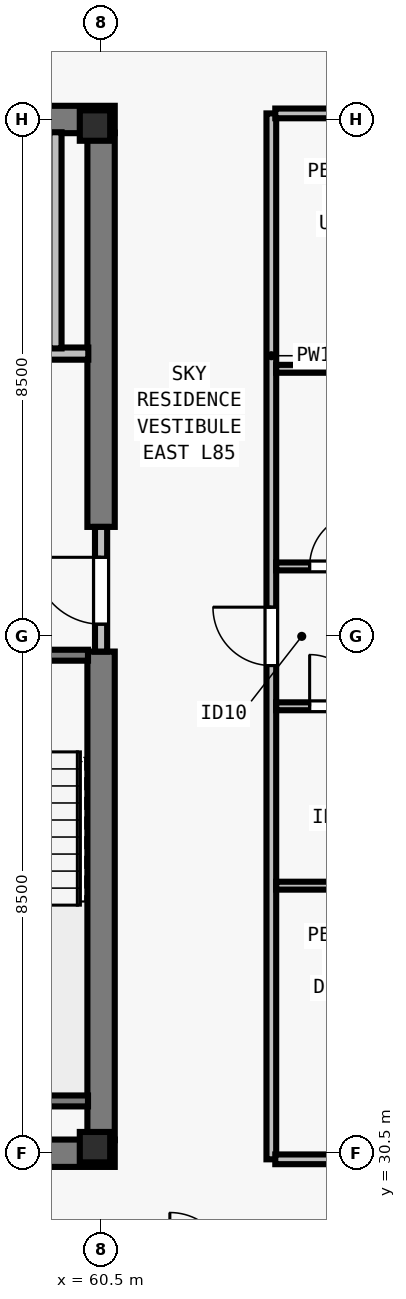
"""IFC4 building model, lengths in metres.
Left out: names, types, materials, properties, quantities, classifications, styles, units other than length and angle.
Written with IfcOpenShell. Run it as: python <this file> out.ifc"""

import sys

from ifc_helpers import new_model, si_unit, direction, frame, frame_2d, origin, origin_2d, place, context, subcontext, project, spatial, rectangle, i_section, extrude, element, fill, save


model = new_model("IFC4")
c1 = context("Model", 3, precision=1e-05, world=origin(), true_north=direction((0.0, 1.0)))
c2 = subcontext(c1, "Body", "Model", "MODEL_VIEW")
j1 = project(units=[si_unit("LENGTHUNIT", "METRE"), si_unit("PLANEANGLEUNIT", "RADIAN")], contexts=[c1])
p1 = place(None, origin())
s1 = spatial("IfcSite", under=j1, at=p1, CompositionType="ELEMENT")
p2 = place(p1, origin())
s2 = spatial("IfcBuilding", under=s1, at=p2, CompositionType="ELEMENT")
p3 = place(p2, frame((0.0, 0.0, 308.5)))
s3 = spatial("IfcBuildingStorey", under=s2, at=p3, CompositionType="ELEMENT", Elevation=308.5)
for number, where, z_axis, x_axis in (
    (1, (60.4, 30.6, 0.0), (0.0, 0.0, 1.0), (1.0, 0.0, 0.0)),
    (2, (60.4, 47.4, 0.0), (0.0, 0.0, 1.0), (1.0, 0.0, 0.0)),
):
    element("IfcColumn", number, at=place(p3, frame(where, z_axis=z_axis, x_axis=x_axis)), inside=s3, PredefinedType="COLUMN", context=c2, shape_type="SweptSolid", body=[
        extrude(i_section(OverallWidth=0.5, OverallDepth=0.5, WebThickness=0.028, FlangeThickness=0.045, at=origin_2d()), origin(), (0.0, 0.0, 1.0), 3.5),
    ])
for number, where, z_axis, x_axis in (
    (3, (43.275, 30.5, 0.0), (0.0, 0.0, 1.0), (1.0, 0.0, 0.0)),
    (4, (43.275, 47.5, 0.0), (0.0, 0.0, 1.0), (1.0, 0.0, 0.0)),
):
    element("IfcWall", number, at=place(p3, frame(where, z_axis=z_axis, x_axis=x_axis)), inside=s3, PredefinedType="SHEAR", context=c2, shape_type="SweptSolid", body=[
        extrude(rectangle(XDim=17.45, YDim=0.45, at=frame_2d((8.725, 0.0))), origin(), (0.0, 0.0, 1.0), 3.29),
    ])
p4 = place(p3, frame((60.5, 30.715, 0.0), z_axis=(0.0, 0.0, 1.0), x_axis=(0.0, 1.0, 0.0)))
e5 = element("IfcWall", 5, at=p4, inside=s3, PredefinedType="SHEAR", context=c2, shape_type="SweptSolid", body=[
    extrude(rectangle(XDim=8.035, YDim=0.45, at=frame_2d((4.018, 0.0))), origin(), (0.0, 0.0, 1.0), 3.29),
])
p5 = place(p3, frame((60.5, 40.8, 0.0), z_axis=(0.0, 0.0, 1.0), x_axis=(0.0, 1.0, 0.0)))
e6 = element("IfcWall", 6, at=p5, inside=s3, PredefinedType="SHEAR", context=c2, shape_type="SweptSolid", body=[
    extrude(rectangle(XDim=6.485, YDim=0.45, at=frame_2d((3.242, 0.0))), origin(), (0.0, 0.0, 1.0), 3.29),
])
p6 = place(p3, frame((60.5, 38.75, 0.0), z_axis=(0.0, 0.0, 1.0), x_axis=(0.0, 1.0, 0.0)))
e7 = element("IfcWall", 7, at=p6, inside=s3, PredefinedType="SOLIDWALL", context=c2, shape_type="SweptSolid", body=[
    extrude(rectangle(XDim=2.05, YDim=0.2, at=frame_2d((1.025, 0.0))), origin(), (0.0, 0.0, 1.0), 3.29),
])
p7 = place(p6, frame((0.45, 0.0, 0.0)))
e8 = element("IfcOpeningElement", 8, at=p7, cuts=e7, PredefinedType="OPENING", context=c2, shape_type="SweptSolid", body=[
    extrude(rectangle(XDim=1.1, YDim=2.15, at=frame_2d((0.55, 1.075))), frame((0.0, 0.11, 0.0), z_axis=(0.0, -1.0, 0.0), x_axis=(1.0, 0.0, 0.0)), (0.0, 0.0, 1.0), 0.22),
])
p8 = place(p3, frame((56.735, 43.65, 0.0), z_axis=(0.0, 0.0, 1.0), x_axis=(1.0, 0.0, 0.0)))
e9 = element("IfcWall", 9, at=p8, inside=s3, PredefinedType="SOLIDWALL", context=c2, shape_type="SweptSolid", body=[
    extrude(rectangle(XDim=3.555, YDim=0.2, at=frame_2d((1.777, 0.0))), origin(), (0.0, 0.0, 1.0), 3.29),
])
p9 = place(p8, frame((1.295, 0.0, 0.0)))
e10 = element("IfcOpeningElement", 10, at=p9, cuts=e9, PredefinedType="OPENING", context=c2, shape_type="SweptSolid", body=[
    extrude(rectangle(XDim=1.1, YDim=2.2, at=frame_2d((0.55, 1.1))), frame((0.0, 0.11, 0.0), z_axis=(0.0, -1.0, 0.0), x_axis=(1.0, 0.0, 0.0)), (0.0, 0.0, 1.0), 0.22),
])
p10 = place(p3, frame((59.75, 43.735, 0.0), z_axis=(0.0, 0.0, 1.0), x_axis=(0.0, 1.0, 0.0)))
e11 = element("IfcWall", 11, at=p10, inside=s3, PredefinedType="SOLIDWALL", context=c2, shape_type="SweptSolid", body=[
    extrude(rectangle(XDim=3.555, YDim=0.2, at=frame_2d((1.777, 0.0))), origin(), (0.0, 0.0, 1.0), 3.29),
])
p11 = place(p3, frame((63.3, 30.4, 0.0), z_axis=(0.0, 0.0, 1.0), x_axis=(0.0, 1.0, 0.0)))
e12 = element("IfcWall", 12, at=p11, inside=s3, PredefinedType="PARTITIONING", context=c2, shape_type="SweptSolid", body=[
    extrude(rectangle(XDim=17.2, YDim=0.16, at=frame_2d((8.6, 0.0))), origin(), (0.0, 0.0, 1.0), 3.29),
])
p12 = place(p11, frame((8.12, 0.0, 0.0)))
e13 = element("IfcOpeningElement", 13, at=p12, cuts=e12, PredefinedType="OPENING", context=c2, shape_type="SweptSolid", body=[
    extrude(rectangle(XDim=0.96, YDim=2.18, at=frame_2d((0.48, 1.09))), frame((0.0, 0.09, 0.0), z_axis=(0.0, -1.0, 0.0), x_axis=(1.0, 0.0, 0.0)), (0.0, 0.0, 1.0), 0.18),
])
for number, where, z_axis, x_axis in (
    (14, (63.365, 30.4, 0.0), (0.0, 0.0, 1.0), (1.0, 0.0, 0.0)),
    (15, (63.365, 47.6, 0.0), (0.0, 0.0, 1.0), (1.0, 0.0, 0.0)),
):
    element("IfcWall", number, at=place(p3, frame(where, z_axis=z_axis, x_axis=x_axis)), inside=s3, PredefinedType="PARTITIONING", context=c2, shape_type="SweptSolid", body=[
        extrude(rectangle(XDim=9.35, YDim=0.16, at=frame_2d((4.675, 0.0))), origin(), (0.0, 0.0, 1.0), 3.29),
    ])
p13 = place(p3, frame((63.38, 34.9, 0.0), z_axis=(0.0, 0.0, 1.0), x_axis=(1.0, 0.0, 0.0)))
e16 = element("IfcWall", 16, at=p13, inside=s3, PredefinedType="PLUMBINGWALL", context=c2, shape_type="SweptSolid", body=[
    extrude(rectangle(XDim=2.75, YDim=0.13, at=frame_2d((1.375, 0.0))), origin(), (0.0, 0.0, 1.0), 3.29),
])
p14 = place(p3, frame((63.38, 37.85, 0.0), z_axis=(0.0, 0.0, 1.0), x_axis=(1.0, 0.0, 0.0)))
e17 = element("IfcWall", 17, at=p14, inside=s3, PredefinedType="PLUMBINGWALL", context=c2, shape_type="SweptSolid", body=[
    extrude(rectangle(XDim=2.75, YDim=0.13, at=frame_2d((1.375, 0.0))), origin(), (0.0, 0.0, 1.0), 3.29),
])
p15 = place(p14, frame((0.55, 0.0, 0.0)))
e18 = element("IfcOpeningElement", 18, at=p15, cuts=e17, PredefinedType="OPENING", context=c2, shape_type="SweptSolid", body=[
    extrude(rectangle(XDim=0.85, YDim=2.08, at=frame_2d((0.425, 1.04))), frame((0.0, 0.075, 0.0), z_axis=(0.0, -1.0, 0.0), x_axis=(1.0, 0.0, 0.0)), (0.0, 0.0, 1.0), 0.15),
])
p16 = place(p3, frame((63.38, 43.4, 0.0), z_axis=(0.0, 0.0, 1.0), x_axis=(1.0, 0.0, 0.0)))
e19 = element("IfcWall", 19, at=p16, inside=s3, PredefinedType="PLUMBINGWALL", context=c2, shape_type="SweptSolid", body=[
    extrude(rectangle(XDim=2.75, YDim=0.13, at=frame_2d((1.375, 0.0))), origin(), (0.0, 0.0, 1.0), 3.29),
])
p17 = place(p3, frame((63.38, 40.15, 0.0), z_axis=(0.0, 0.0, 1.0), x_axis=(1.0, 0.0, 0.0)))
e20 = element("IfcWall", 20, at=p17, inside=s3, PredefinedType="PLUMBINGWALL", context=c2, shape_type="SweptSolid", body=[
    extrude(rectangle(XDim=2.75, YDim=0.13, at=frame_2d((1.375, 0.0))), origin(), (0.0, 0.0, 1.0), 3.29),
])
p18 = place(p17, frame((0.55, 0.0, 0.0)))
e21 = element("IfcOpeningElement", 21, at=p18, cuts=e20, PredefinedType="OPENING", context=c2, shape_type="SweptSolid", body=[
    extrude(rectangle(XDim=0.88, YDim=2.1, at=frame_2d((0.44, 1.05))), frame((0.0, 0.075, 0.0), z_axis=(0.0, -1.0, 0.0), x_axis=(1.0, 0.0, 0.0)), (0.0, 0.0, 1.0), 0.15),
])
p19 = place(p3, frame((57.005, 38.69, 0.0), z_axis=(0.0, 0.0, 1.0), x_axis=(1.0, 0.0, 0.0)))
e22 = element("IfcWall", 22, at=p19, inside=s3, PredefinedType="SOLIDWALL", context=c2, shape_type="SweptSolid", body=[
    extrude(rectangle(XDim=3.28, YDim=0.18, at=frame_2d((1.64, 0.0))), origin(), (0.0, 0.0, 1.0), 3.29),
])
p20 = place(p19, frame((1.165, 0.0, 0.0)))
e23 = element("IfcOpeningElement", 23, at=p20, cuts=e22, PredefinedType="OPENING", context=c2, shape_type="SweptSolid", body=[
    extrude(rectangle(XDim=0.95, YDim=2.15, at=frame_2d((0.475, 1.075))), frame((0.0, 0.1, 0.0), z_axis=(0.0, -1.0, 0.0), x_axis=(1.0, 0.0, 0.0)), (0.0, 0.0, 1.0), 0.2),
])
p21 = place(p3, frame((57.005, 31.36, 0.0), z_axis=(0.0, 0.0, 1.0), x_axis=(1.0, 0.0, 0.0)))
e24 = element("IfcWall", 24, at=p21, inside=s3, PredefinedType="SOLIDWALL", context=c2, shape_type="SweptSolid", body=[
    extrude(rectangle(XDim=3.28, YDim=0.18, at=frame_2d((1.64, 0.0))), origin(), (0.0, 0.0, 1.0), 3.29),
])
p22 = place(p7, origin())
e25 = element("IfcDoor", 25, at=p22, inside=s3, OperationType="SINGLE_SWING_RIGHT", PredefinedType="DOOR", context=c2, shape_type="SweptSolid", body=[
    extrude(rectangle(XDim=1.1, YDim=2.15, at=frame_2d((0.55, 1.075))), frame((0.0, 0.025, 0.0), z_axis=(0.0, -1.0, 0.0), x_axis=(1.0, 0.0, 0.0)), (0.0, 0.0, 1.0), 0.05),
])
fill(e8, e25)
p23 = place(p15, origin())
e26 = element("IfcDoor", 26, at=p23, inside=s3, OperationType="SINGLE_SWING_LEFT", PredefinedType="DOOR", context=c2, shape_type="SweptSolid", body=[
    extrude(rectangle(XDim=0.85, YDim=2.08, at=frame_2d((0.425, 1.04))), frame((0.0, 0.025, 0.0), z_axis=(0.0, -1.0, 0.0), x_axis=(1.0, 0.0, 0.0)), (0.0, 0.0, 1.0), 0.05),
])
fill(e18, e26)
p24 = place(p18, origin())
e27 = element("IfcDoor", 27, at=p24, inside=s3, OperationType="SINGLE_SWING_RIGHT", PredefinedType="DOOR", context=c2, shape_type="SweptSolid", body=[
    extrude(rectangle(XDim=0.88, YDim=2.1, at=frame_2d((0.44, 1.05))), frame((0.0, 0.025, 0.0), z_axis=(0.0, -1.0, 0.0), x_axis=(1.0, 0.0, 0.0)), (0.0, 0.0, 1.0), 0.05),
])
fill(e21, e27)
p25 = place(p12, origin())
e28 = element("IfcDoor", 28, at=p25, inside=s3, OperationType="SINGLE_SWING_RIGHT", PredefinedType="DOOR", context=c2, shape_type="SweptSolid", body=[
    extrude(rectangle(XDim=0.96, YDim=2.18, at=frame_2d((0.48, 1.09))), frame((0.0, 0.025, 0.0), z_axis=(0.0, -1.0, 0.0), x_axis=(1.0, 0.0, 0.0)), (0.0, 0.0, 1.0), 0.05),
])
fill(e13, e28)
save(model, sys.argv[1])
